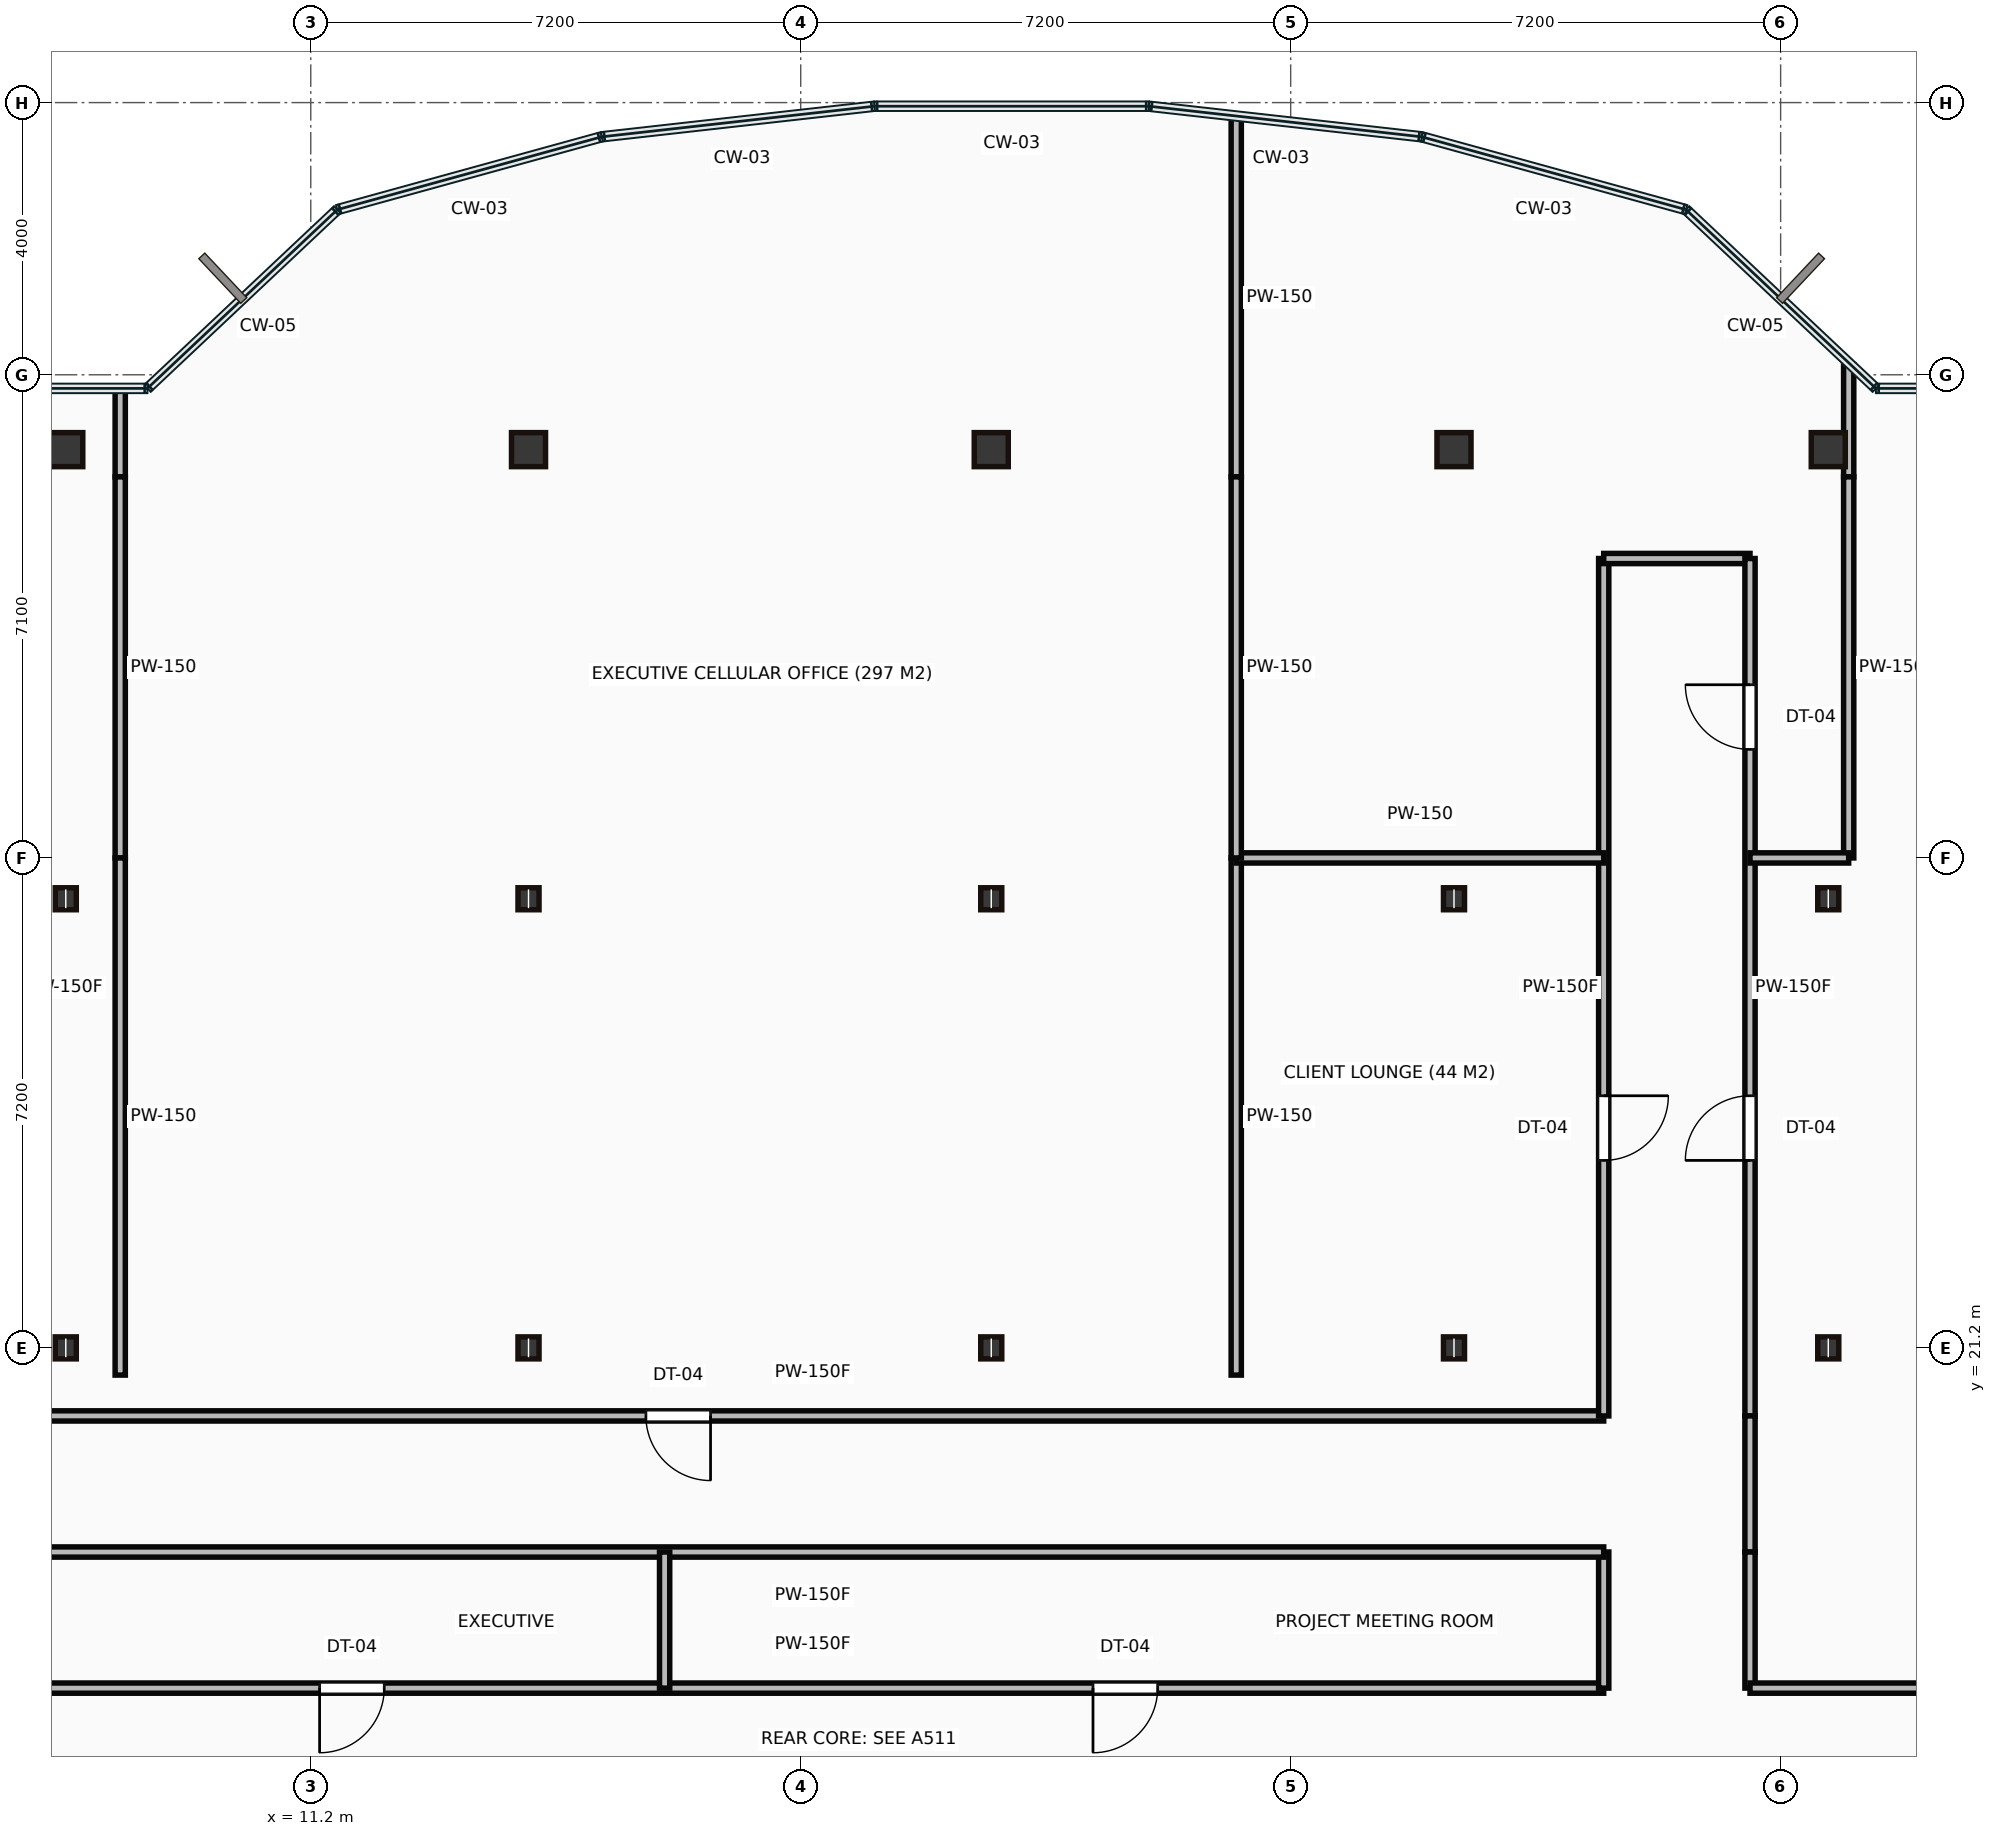
"""IFC4 building model, lengths in metres.
Left out: names, types, materials, properties, quantities, classifications, styles, units other than length and angle.
Written with IfcOpenShell. Run it as: python <this file> out.ifc"""

import sys

from ifc_helpers import new_model, si_unit, direction, frame, frame_2d, origin, origin_2d, place, context, subcontext, project, spatial, rectangle, hollow_rectangle, i_section, extrude, source, transform, mapped, element, fill, save


model = new_model("IFC4")
c1 = context("Model", 3, precision=1e-05, world=origin(), true_north=direction((0.0, 1.0)))
c2 = subcontext(c1, "Body", "Model", "MODEL_VIEW")
j1 = project(units=[si_unit("LENGTHUNIT", "METRE"), si_unit("PLANEANGLEUNIT", "RADIAN")], contexts=[c1])
p1 = place(None, origin())
s1 = spatial("IfcSite", under=j1, at=p1, CompositionType="ELEMENT")
p2 = place(p1, origin())
s2 = spatial("IfcBuilding", under=s1, at=p2, CompositionType="ELEMENT")
p3 = place(p2, frame((0.0, 0.0, 262.45)))
s3 = spatial("IfcBuildingStorey", under=s2, at=p3, CompositionType="ELEMENT", Elevation=262.45)
m1 = source(origin(), c2, "Body", "SweptSolid", [
    extrude(i_section(OverallWidth=0.309, OverallDepth=0.323, WebThickness=0.014, FlangeThickness=0.023, at=origin_2d()), origin(), (0.0, 0.0, 1.0), 3.65),
])
for number, where, z_axis, x_axis in (
    (1, (7.6, 21.2, 0.0), (0.0, 0.0, 1.0), (1.0, 0.0, 0.0)),
    (2, (7.6, 27.8, 0.0), (0.0, 0.0, 1.0), (1.0, 0.0, 0.0)),
):
    element("IfcColumn", number, at=place(p3, frame(where, z_axis=z_axis, x_axis=x_axis)), inside=s3, PredefinedType="COLUMN", context=c2, shape_type="MappedRepresentation", body=[
        mapped(m1, transform((0.0, 0.0, 0.0))),
    ])
m2 = source(origin(), c2, "Body", "SweptSolid", [
    extrude(hollow_rectangle(XDim=0.5, YDim=0.5, WallThickness=0.022, at=origin_2d()), origin(), (0.0, 0.0, 1.0), 3.65),
])
p4 = place(p3, frame((7.6, 34.4, 0.0), z_axis=(0.0, 0.0, 1.0), x_axis=(1.0, 0.0, 0.0)))
e3 = element("IfcColumn", 3, at=p4, inside=s3, PredefinedType="COLUMN", context=c2, shape_type="MappedRepresentation", body=[
    mapped(m2, transform((0.0, 0.0, 0.0))),
])
for number, where, z_axis, x_axis in (
    (4, (14.4, 21.2, 0.0), (0.0, 0.0, 1.0), (1.0, 0.0, 0.0)),
    (5, (14.4, 27.8, 0.0), (0.0, 0.0, 1.0), (1.0, 0.0, 0.0)),
):
    element("IfcColumn", number, at=place(p3, frame(where, z_axis=z_axis, x_axis=x_axis)), inside=s3, PredefinedType="COLUMN", context=c2, shape_type="MappedRepresentation", body=[
        mapped(m1, transform((0.0, 0.0, 0.0))),
    ])
p5 = place(p3, frame((14.4, 34.4, 0.0), z_axis=(0.0, 0.0, 1.0), x_axis=(1.0, 0.0, 0.0)))
e6 = element("IfcColumn", 6, at=p5, inside=s3, PredefinedType="COLUMN", context=c2, shape_type="MappedRepresentation", body=[
    mapped(m2, transform((0.0, 0.0, 0.0))),
])
for number, where, z_axis, x_axis in (
    (7, (21.2, 21.2, 0.0), (0.0, 0.0, 1.0), (1.0, 0.0, 0.0)),
    (8, (21.2, 27.8, 0.0), (0.0, 0.0, 1.0), (1.0, 0.0, 0.0)),
):
    element("IfcColumn", number, at=place(p3, frame(where, z_axis=z_axis, x_axis=x_axis)), inside=s3, PredefinedType="COLUMN", context=c2, shape_type="MappedRepresentation", body=[
        mapped(m1, transform((0.0, 0.0, 0.0))),
    ])
p6 = place(p3, frame((21.2, 34.4, 0.0), z_axis=(0.0, 0.0, 1.0), x_axis=(1.0, 0.0, 0.0)))
e9 = element("IfcColumn", 9, at=p6, inside=s3, PredefinedType="COLUMN", context=c2, shape_type="MappedRepresentation", body=[
    mapped(m2, transform((0.0, 0.0, 0.0))),
])
for number, where, z_axis, x_axis in (
    (10, (28.0, 21.2, 0.0), (0.0, 0.0, 1.0), (1.0, 0.0, 0.0)),
    (11, (28.0, 27.8, 0.0), (0.0, 0.0, 1.0), (1.0, 0.0, 0.0)),
):
    element("IfcColumn", number, at=place(p3, frame(where, z_axis=z_axis, x_axis=x_axis)), inside=s3, PredefinedType="COLUMN", context=c2, shape_type="MappedRepresentation", body=[
        mapped(m1, transform((0.0, 0.0, 0.0))),
    ])
p7 = place(p3, frame((28.0, 34.4, 0.0), z_axis=(0.0, 0.0, 1.0), x_axis=(1.0, 0.0, 0.0)))
e12 = element("IfcColumn", 12, at=p7, inside=s3, PredefinedType="COLUMN", context=c2, shape_type="MappedRepresentation", body=[
    mapped(m2, transform((0.0, 0.0, 0.0))),
])
for number, where, z_axis, x_axis in (
    (13, (33.5, 21.2, 0.0), (0.0, 0.0, 1.0), (1.0, 0.0, 0.0)),
    (14, (33.5, 27.8, 0.0), (0.0, 0.0, 1.0), (1.0, 0.0, 0.0)),
):
    element("IfcColumn", number, at=place(p3, frame(where, z_axis=z_axis, x_axis=x_axis)), inside=s3, PredefinedType="COLUMN", context=c2, shape_type="MappedRepresentation", body=[
        mapped(m1, transform((0.0, 0.0, 0.0))),
    ])
p8 = place(p3, frame((33.5, 34.4, 0.0), z_axis=(0.0, 0.0, 1.0), x_axis=(1.0, 0.0, 0.0)))
e15 = element("IfcColumn", 15, at=p8, inside=s3, PredefinedType="COLUMN", context=c2, shape_type="MappedRepresentation", body=[
    mapped(m2, transform((0.0, 0.0, 0.0))),
])
m3 = source(origin(), c2, "Body", "SweptSolid", [
    extrude(rectangle(XDim=23.25, YDim=0.15, at=frame_2d((11.625, 0.0))), origin(), (0.0, 0.0, 1.0), 3.4),
])
p9 = place(p3, frame((6.95, 20.2, 0.0), z_axis=(0.0, 0.0, 1.0), x_axis=(1.0, 0.0, 0.0)))
e16 = element("IfcWall", 16, at=p9, inside=s3, PredefinedType="PARTITIONING", context=c2, shape_type="MappedRepresentation", body=[
    mapped(m3, transform((0.0, 0.0, 0.0))),
])
p10 = place(p9, frame((9.175, 0.0, 0.0)))
e17 = element("IfcOpeningElement", 17, at=p10, cuts=e16, PredefinedType="OPENING", context=c2, shape_type="SweptSolid", body=[
    extrude(rectangle(XDim=0.95, YDim=2.15, at=frame_2d((0.475, 1.075))), frame((0.0, 0.085, 0.0), z_axis=(0.0, -1.0, 0.0), x_axis=(1.0, 0.0, 0.0)), (0.0, 0.0, 1.0), 0.17),
])
m4 = source(origin(), c2, "Body", "SweptSolid", [
    extrude(rectangle(XDim=12.6, YDim=0.15, at=frame_2d((6.3, 0.0))), origin(), (0.0, 0.0, 1.0), 3.4),
])
p11 = place(p3, frame((30.2, 20.2, 0.0), z_axis=(0.0, 0.0, 1.0), x_axis=(0.0, 1.0, 0.0)))
e18 = element("IfcWall", 18, at=p11, inside=s3, PredefinedType="PARTITIONING", context=c2, shape_type="MappedRepresentation", body=[
    mapped(m4, transform((0.0, 0.0, 0.0))),
])
p12 = place(p11, frame((3.755, 0.0, 0.0)))
e19 = element("IfcOpeningElement", 19, at=p12, cuts=e18, PredefinedType="OPENING", context=c2, shape_type="SweptSolid", body=[
    extrude(rectangle(XDim=0.95, YDim=2.15, at=frame_2d((0.475, 1.075))), frame((0.0, 0.085, 0.0), z_axis=(0.0, -1.0, 0.0), x_axis=(1.0, 0.0, 0.0)), (0.0, 0.0, 1.0), 0.17),
])
m5 = source(origin(), c2, "Body", "SweptSolid", [
    extrude(rectangle(XDim=2.15, YDim=0.15, at=frame_2d((1.075, 0.0))), origin(), (0.0, 0.0, 1.0), 3.4),
])
p13 = place(p3, frame((30.2, 32.8, 0.0), z_axis=(0.0, 0.0, 1.0), x_axis=(1.0, 0.0, 0.0)))
e20 = element("IfcWall", 20, at=p13, inside=s3, PredefinedType="PARTITIONING", context=c2, shape_type="MappedRepresentation", body=[
    mapped(m5, transform((0.0, 0.0, 0.0))),
])
p14 = place(p3, frame((32.35, 32.8, 0.0), z_axis=(0.0, 0.0, 1.0), x_axis=(0.0, -1.0, 0.0)))
e21 = element("IfcWall", 21, at=p14, inside=s3, PredefinedType="PARTITIONING", context=c2, shape_type="MappedRepresentation", body=[
    mapped(m4, transform((0.0, 0.0, 0.0))),
])
p15 = place(p14, frame((1.855, 0.0, 0.0)))
e22 = element("IfcOpeningElement", 22, at=p15, cuts=e21, PredefinedType="OPENING", context=c2, shape_type="SweptSolid", body=[
    extrude(rectangle(XDim=0.95, YDim=2.15, at=frame_2d((0.475, 1.075))), frame((0.0, 0.085, 0.0), z_axis=(0.0, -1.0, 0.0), x_axis=(1.0, 0.0, 0.0)), (0.0, 0.0, 1.0), 0.17),
])
p16 = place(p14, frame((7.895, 0.0, 0.0)))
e23 = element("IfcOpeningElement", 23, at=p16, cuts=e21, PredefinedType="OPENING", context=c2, shape_type="SweptSolid", body=[
    extrude(rectangle(XDim=0.95, YDim=2.15, at=frame_2d((0.475, 1.075))), frame((0.0, 0.085, 0.0), z_axis=(0.0, -1.0, 0.0), x_axis=(1.0, 0.0, 0.0)), (0.0, 0.0, 1.0), 0.17),
])
m6 = source(origin(), c2, "Body", "SweptSolid", [
    extrude(rectangle(XDim=2.0, YDim=0.15, at=frame_2d((1.0, 0.0))), origin(), (0.0, 0.0, 1.0), 3.4),
])
for number, where, z_axis, x_axis in (
    (24, (32.35, 20.2, 0.0), (0.0, 0.0, 1.0), (0.0, -1.0, 0.0)),
    (25, (32.35, 18.2, 0.0), (0.0, 0.0, 1.0), (0.0, -1.0, 0.0)),
):
    element("IfcWall", number, at=place(p3, frame(where, z_axis=z_axis, x_axis=x_axis)), inside=s3, PredefinedType="PARTITIONING", context=c2, shape_type="MappedRepresentation", body=[
        mapped(m6, transform((0.0, 0.0, 0.0))),
    ])
m7 = source(origin(), c2, "Body", "SweptSolid", [
    extrude(rectangle(XDim=6.85, YDim=0.15, at=frame_2d((3.425, 0.0))), origin(), (0.0, 0.0, 1.0), 3.4),
])
p17 = place(p3, frame((32.35, 16.2, 0.0), z_axis=(0.0, 0.0, 1.0), x_axis=(1.0, 0.0, 0.0)))
e26 = element("IfcWall", 26, at=p17, inside=s3, PredefinedType="PARTITIONING", context=c2, shape_type="MappedRepresentation", body=[
    mapped(m7, transform((0.0, 0.0, 0.0))),
])
p18 = place(p3, frame((6.95, 16.2, 0.0), z_axis=(0.0, 0.0, 1.0), x_axis=(1.0, 0.0, 0.0)))
e27 = element("IfcWall", 27, at=p18, inside=s3, PredefinedType="PARTITIONING", context=c2, shape_type="MappedRepresentation", body=[
    mapped(m3, transform((0.0, 0.0, 0.0))),
])
p19 = place(p18, frame((4.38, 0.0, 0.0)))
e28 = element("IfcOpeningElement", 28, at=p19, cuts=e27, PredefinedType="OPENING", context=c2, shape_type="SweptSolid", body=[
    extrude(rectangle(XDim=0.95, YDim=2.15, at=frame_2d((0.475, 1.075))), frame((0.0, 0.085, 0.0), z_axis=(0.0, -1.0, 0.0), x_axis=(1.0, 0.0, 0.0)), (0.0, 0.0, 1.0), 0.17),
])
p20 = place(p18, frame((15.745, 0.0, 0.0)))
e29 = element("IfcOpeningElement", 29, at=p20, cuts=e27, PredefinedType="OPENING", context=c2, shape_type="SweptSolid", body=[
    extrude(rectangle(XDim=0.95, YDim=2.15, at=frame_2d((0.475, 1.075))), frame((0.0, 0.085, 0.0), z_axis=(0.0, -1.0, 0.0), x_axis=(1.0, 0.0, 0.0)), (0.0, 0.0, 1.0), 0.17),
])
p21 = place(p3, frame((30.2, 16.2, 0.0), z_axis=(0.0, 0.0, 1.0), x_axis=(0.0, 1.0, 0.0)))
e30 = element("IfcWall", 30, at=p21, inside=s3, PredefinedType="PARTITIONING", context=c2, shape_type="MappedRepresentation", body=[
    mapped(m6, transform((0.0, 0.0, 0.0))),
])
p22 = place(p3, frame((30.2, 18.2, 0.0), z_axis=(0.0, 0.0, 1.0), x_axis=(-1.0, 0.0, 0.0)))
e31 = element("IfcWall", 31, at=p22, inside=s3, PredefinedType="PARTITIONING", context=c2, shape_type="MappedRepresentation", body=[
    mapped(m3, transform((0.0, 0.0, 0.0))),
])
m8 = source(origin(), c2, "Body", "SweptSolid", [
    extrude(rectangle(XDim=1.28, YDim=0.15, at=frame_2d((0.64, 0.0))), origin(), (0.0, 0.0, 1.0), 3.4),
])
p23 = place(p3, frame((8.4, 35.28, 0.0), z_axis=(0.0, 0.0, 1.0), x_axis=(0.0, -1.0, 0.0)))
e32 = element("IfcWall", 32, at=p23, inside=s3, PredefinedType="PARTITIONING", context=c2, shape_type="MappedRepresentation", body=[
    mapped(m8, transform((0.0, 0.0, 0.0))),
])
m9 = source(origin(), c2, "Body", "SweptSolid", [
    extrude(rectangle(XDim=5.6, YDim=0.15, at=frame_2d((2.8, 0.0))), origin(), (0.0, 0.0, 1.0), 3.4),
])
p24 = place(p3, frame((8.4, 34.0, 0.0), z_axis=(0.0, 0.0, 1.0), x_axis=(0.0, -1.0, 0.0)))
e33 = element("IfcWall", 33, at=p24, inside=s3, PredefinedType="PARTITIONING", context=c2, shape_type="MappedRepresentation", body=[
    mapped(m9, transform((0.0, 0.0, 0.0))),
])
m10 = source(origin(), c2, "Body", "SweptSolid", [
    extrude(rectangle(XDim=7.6, YDim=0.15, at=frame_2d((3.8, 0.0))), origin(), (0.0, 0.0, 1.0), 3.4),
])
p25 = place(p3, frame((8.4, 28.4, 0.0), z_axis=(0.0, 0.0, 1.0), x_axis=(0.0, -1.0, 0.0)))
e34 = element("IfcWall", 34, at=p25, inside=s3, PredefinedType="PARTITIONING", context=c2, shape_type="MappedRepresentation", body=[
    mapped(m10, transform((0.0, 0.0, 0.0))),
])
p26 = place(p3, frame((16.4, 18.2, 0.0), z_axis=(0.0, 0.0, 1.0), x_axis=(0.0, -1.0, 0.0)))
e35 = element("IfcWall", 35, at=p26, inside=s3, PredefinedType="PARTITIONING", context=c2, shape_type="MappedRepresentation", body=[
    mapped(m6, transform((0.0, 0.0, 0.0))),
])
p27 = place(p3, frame((24.8, 28.4, 0.0), z_axis=(0.0, 0.0, 1.0), x_axis=(0.0, -1.0, 0.0)))
e36 = element("IfcWall", 36, at=p27, inside=s3, PredefinedType="PARTITIONING", context=c2, shape_type="MappedRepresentation", body=[
    mapped(m10, transform((0.0, 0.0, 0.0))),
])
m11 = source(origin(), c2, "Body", "SweptSolid", [
    extrude(rectangle(XDim=5.4, YDim=0.15, at=frame_2d((2.7, 0.0))), origin(), (0.0, 0.0, 1.0), 3.4),
])
p28 = place(p3, frame((24.8, 28.4, 0.0), z_axis=(0.0, 0.0, 1.0), x_axis=(1.0, 0.0, 0.0)))
e37 = element("IfcWall", 37, at=p28, inside=s3, PredefinedType="PARTITIONING", context=c2, shape_type="MappedRepresentation", body=[
    mapped(m11, transform((0.0, 0.0, 0.0))),
])
m12 = source(origin(), c2, "Body", "SweptSolid", [
    extrude(rectangle(XDim=5.283, YDim=0.15, at=frame_2d((2.641, 0.0))), origin(), (0.0, 0.0, 1.0), 3.4),
])
p29 = place(p3, frame((24.8, 39.283, 0.0), z_axis=(0.0, 0.0, 1.0), x_axis=(0.0, -1.0, 0.0)))
e38 = element("IfcWall", 38, at=p29, inside=s3, PredefinedType="PARTITIONING", context=c2, shape_type="MappedRepresentation", body=[
    mapped(m12, transform((0.0, 0.0, 0.0))),
])
p30 = place(p3, frame((24.8, 34.0, 0.0), z_axis=(0.0, 0.0, 1.0), x_axis=(0.0, -1.0, 0.0)))
e39 = element("IfcWall", 39, at=p30, inside=s3, PredefinedType="PARTITIONING", context=c2, shape_type="MappedRepresentation", body=[
    mapped(m9, transform((0.0, 0.0, 0.0))),
])
m13 = source(origin(), c2, "Body", "SweptSolid", [
    extrude(rectangle(XDim=1.649, YDim=0.15, at=frame_2d((0.825, 0.0))), origin(), (0.0, 0.0, 1.0), 3.4),
])
p31 = place(p3, frame((33.8, 35.649, 0.0), z_axis=(0.0, 0.0, 1.0), x_axis=(0.0, -1.0, 0.0)))
e40 = element("IfcWall", 40, at=p31, inside=s3, PredefinedType="PARTITIONING", context=c2, shape_type="MappedRepresentation", body=[
    mapped(m13, transform((0.0, 0.0, 0.0))),
])
p32 = place(p3, frame((33.8, 34.0, 0.0), z_axis=(0.0, 0.0, 1.0), x_axis=(0.0, -1.0, 0.0)))
e41 = element("IfcWall", 41, at=p32, inside=s3, PredefinedType="PARTITIONING", context=c2, shape_type="MappedRepresentation", body=[
    mapped(m9, transform((0.0, 0.0, 0.0))),
])
m14 = source(origin(), c2, "Body", "SweptSolid", [
    extrude(rectangle(XDim=1.45, YDim=0.15, at=frame_2d((0.725, 0.0))), origin(), (0.0, 0.0, 1.0), 3.4),
])
p33 = place(p3, frame((33.8, 28.4, 0.0), z_axis=(0.0, 0.0, 1.0), x_axis=(-1.0, 0.0, 0.0)))
e42 = element("IfcWall", 42, at=p33, inside=s3, PredefinedType="PARTITIONING", context=c2, shape_type="MappedRepresentation", body=[
    mapped(m14, transform((0.0, 0.0, 0.0))),
])
m15 = source(origin(), c2, "Body", "SweptSolid", [
    extrude(rectangle(XDim=0.95, YDim=2.15, at=frame_2d((0.475, 1.075))), frame((0.0, 0.025, 0.0), z_axis=(0.0, -1.0, 0.0), x_axis=(1.0, 0.0, 0.0)), (0.0, 0.0, 1.0), 0.05),
])
p34 = place(p19, origin())
e43 = element("IfcDoor", 43, at=p34, inside=s3, OperationType="SINGLE_SWING_LEFT", PredefinedType="DOOR", context=c2, shape_type="MappedRepresentation", body=[
    mapped(m15, transform((0.0, 0.0, 0.0))),
])
fill(e28, e43)
p35 = place(p10, origin())
e44 = element("IfcDoor", 44, at=p35, inside=s3, OperationType="SINGLE_SWING_RIGHT", PredefinedType="DOOR", context=c2, shape_type="MappedRepresentation", body=[
    mapped(m15, transform((0.0, 0.0, 0.0))),
])
fill(e17, e44)
p36 = place(p20, origin())
e45 = element("IfcDoor", 45, at=p36, inside=s3, OperationType="SINGLE_SWING_LEFT", PredefinedType="DOOR", context=c2, shape_type="MappedRepresentation", body=[
    mapped(m15, transform((0.0, 0.0, 0.0))),
])
fill(e29, e45)
p37 = place(p12, origin())
e46 = element("IfcDoor", 46, at=p37, inside=s3, OperationType="SINGLE_SWING_RIGHT", PredefinedType="DOOR", context=c2, shape_type="MappedRepresentation", body=[
    mapped(m15, transform((0.0, 0.0, 0.0))),
])
fill(e19, e46)
p38 = place(p15, origin())
e47 = element("IfcDoor", 47, at=p38, inside=s3, OperationType="SINGLE_SWING_LEFT", PredefinedType="DOOR", context=c2, shape_type="MappedRepresentation", body=[
    mapped(m15, transform((0.0, 0.0, 0.0))),
])
fill(e22, e47)
p39 = place(p16, origin())
e48 = element("IfcDoor", 48, at=p39, inside=s3, OperationType="SINGLE_SWING_RIGHT", PredefinedType="DOOR", context=c2, shape_type="MappedRepresentation", body=[
    mapped(m15, transform((0.0, 0.0, 0.0))),
])
fill(e23, e48)
save(model, sys.argv[1])
